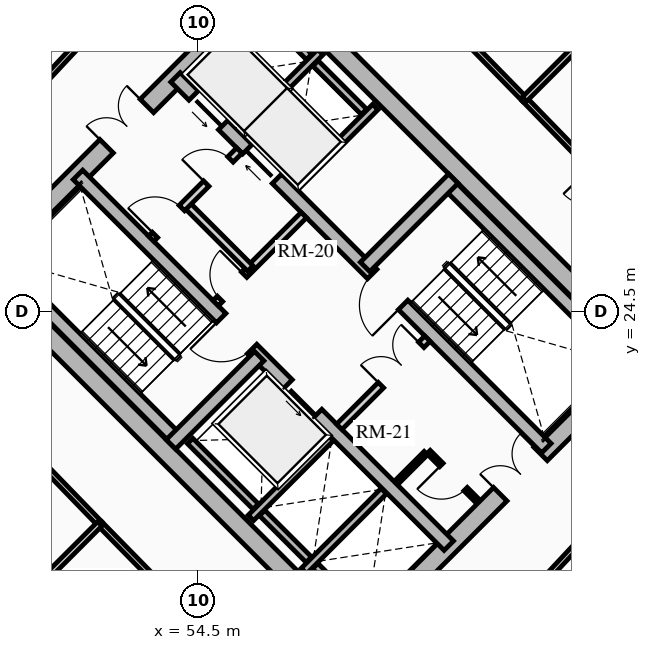
"""IFC4 building model, lengths in metres.
Left out: names, types, materials, properties, quantities, classifications, styles, units other than length and angle.
Written with IfcOpenShell. Run it as: python <this file> out.ifc"""

import sys

from ifc_helpers import new_model, si_unit, direction, frame, frame_2d, origin, place, context, subcontext, project, spatial, rectangle, extrude, source, transform, mapped, element, fill, save


model = new_model("IFC4")
c1 = context("Model", 3, precision=1e-05, world=origin(), true_north=direction((0.0, 1.0)))
c2 = subcontext(c1, "Body", "Model", "MODEL_VIEW")
j1 = project(units=[si_unit("LENGTHUNIT", "METRE"), si_unit("PLANEANGLEUNIT", "RADIAN")], contexts=[c1])
p1 = place(None, origin())
s1 = spatial("IfcSite", under=j1, at=p1, CompositionType="ELEMENT")
p2 = place(p1, origin())
s2 = spatial("IfcBuilding", under=s1, at=p2, CompositionType="ELEMENT")
p3 = place(p2, frame((0.0, 0.0, 56.92)))
s3 = spatial("IfcBuildingStorey", under=s2, at=p3, CompositionType="ELEMENT", Elevation=56.92)
for number, where, z_axis, x_axis in (
    (1, (58.773, 15.661, 0.0), (0.0, 0.0, 1.0), (-0.707, 0.707, 0.0)),
    (2, (66.339, 23.227, 0.0), (0.0, 0.0, 1.0), (-0.707, 0.707, 0.0)),
):
    element("IfcWall", number, at=place(p3, frame(where, z_axis=z_axis, x_axis=x_axis)), inside=s3, PredefinedType="SHEAR", context=c2, shape_type="SweptSolid", body=[
        extrude(rectangle(XDim=14.3, YDim=0.5, at=frame_2d((7.15, 0.0))), origin(), (0.0, 0.0, 1.0), 2.91),
    ])
p4 = place(p3, frame((58.596, 15.838, 0.0), z_axis=(0.0, 0.0, 1.0), x_axis=(0.707106781187, 0.707106781187, 0.0)))
e3 = element("IfcWall", 3, at=p4, inside=s3, PredefinedType="SHEAR", context=c2, shape_type="SweptSolid", body=[
    extrude(rectangle(XDim=10.7, YDim=0.5, at=frame_2d((5.35, 0.0))), origin(), (0.0, 0.0, 1.0), 2.91),
])
m1 = source(origin(), c2, "Body", "SweptSolid", [
    extrude(rectangle(XDim=1.5, YDim=2.02, at=frame_2d((0.75, 1.01))), frame((0.0, 0.26, 0.0), z_axis=(0.0, -1.0, 0.0), x_axis=(1.0, 0.0, 0.0)), (0.0, 0.0, 1.0), 0.52),
])
p5 = place(p4, frame((5.45, 0.0, 0.0)))
e4 = element("IfcOpeningElement", 4, at=p5, cuts=e3, PredefinedType="OPENING", context=c2, shape_type="MappedRepresentation", body=[
    mapped(m1, transform((0.0, 0.0, 0.0), x_axis=(1.0, 0.0, 0.0), y_axis=(0.0, 1.0, 0.0), z_axis=(0.0, 0.0, 1.0), scale=1.0)),
])
p6 = place(p3, frame((48.838, 25.596, 0.0), z_axis=(0.0, 0.0, 1.0), x_axis=(0.707106781187, 0.707106781187, 0.0)))
e5 = element("IfcWall", 5, at=p6, inside=s3, PredefinedType="SHEAR", context=c2, shape_type="SweptSolid", body=[
    extrude(rectangle(XDim=10.7, YDim=0.5, at=frame_2d((5.35, 0.0))), origin(), (0.0, 0.0, 1.0), 2.91),
])
p7 = place(p6, frame((4.6, 0.0, 0.0)))
e6 = element("IfcOpeningElement", 6, at=p7, cuts=e5, PredefinedType="OPENING", context=c2, shape_type="MappedRepresentation", body=[
    mapped(m1, transform((0.0, 0.0, 0.0), x_axis=(1.0, 0.0, 0.0), y_axis=(0.0, 1.0, 0.0), z_axis=(0.0, 0.0, 1.0), scale=1.0)),
])
p8 = place(p3, frame((61.096, 18.338, 0.0), z_axis=(0.0, 0.0, 1.0), x_axis=(-0.707106781187, 0.707106781187, 0.0)))
e7 = element("IfcWall", 7, at=p8, inside=s3, PredefinedType="SHEAR", context=c2, shape_type="SweptSolid", body=[
    extrude(rectangle(XDim=13.8, YDim=0.35, at=frame_2d((6.9, 0.0))), origin(), (0.0, 0.0, 1.0), 2.91),
])
m2 = source(origin(), c2, "Body", "SweptSolid", [
    extrude(rectangle(XDim=1.1, YDim=2.015, at=frame_2d((0.55, 1.007))), frame((0.0, 0.185, 0.0), z_axis=(0.0, -1.0, 0.0), x_axis=(1.0, 0.0, 0.0)), (0.0, 0.0, 1.0), 0.37),
])
p9 = place(p8, frame((4.9, 0.0, 0.0)))
e8 = element("IfcOpeningElement", 8, at=p9, cuts=e7, PredefinedType="OPENING", context=c2, shape_type="MappedRepresentation", body=[
    mapped(m2, transform((0.0, 0.0, 0.0), x_axis=(1.0, 0.0, 0.0), y_axis=(0.0, 1.0, 0.0), z_axis=(0.0, 0.0, 1.0), scale=1.0)),
])
m3 = source(origin(), c2, "Body", "SweptSolid", [
    extrude(rectangle(XDim=1.15, YDim=2.02, at=frame_2d((0.575, 1.01))), frame((0.0, 0.185, 0.0), z_axis=(0.0, -1.0, 0.0), x_axis=(1.0, 0.0, 0.0)), (0.0, 0.0, 1.0), 0.37),
])
p10 = place(p8, frame((7.32, 0.0, 0.0)))
e9 = element("IfcOpeningElement", 9, at=p10, cuts=e7, PredefinedType="OPENING", context=c2, shape_type="MappedRepresentation", body=[
    mapped(m3, transform((0.0, 0.0, 0.0), x_axis=(1.0, 0.0, 0.0), y_axis=(0.0, 1.0, 0.0), z_axis=(0.0, 0.0, 1.0), scale=1.0)),
])
p11 = place(p3, frame((63.662, 20.904, 0.0), z_axis=(0.0, 0.0, 1.0), x_axis=(-0.707106781187, 0.707106781187, 0.0)))
e10 = element("IfcWall", 10, at=p11, inside=s3, PredefinedType="SHEAR", context=c2, shape_type="SweptSolid", body=[
    extrude(rectangle(XDim=13.8, YDim=0.35, at=frame_2d((6.9, 0.0))), origin(), (0.0, 0.0, 1.0), 2.91),
])
p12 = place(p11, frame((10.025, 0.0, 0.0)))
e11 = element("IfcOpeningElement", 11, at=p12, cuts=e10, PredefinedType="OPENING", context=c2, shape_type="MappedRepresentation", body=[
    mapped(m2, transform((0.0, 0.0, 0.0), x_axis=(1.0, 0.0, 0.0), y_axis=(0.0, 1.0, 0.0), z_axis=(0.0, 0.0, 1.0), scale=1.0)),
])
p13 = place(p11, frame((12.025, 0.0, 0.0)))
e12 = element("IfcOpeningElement", 12, at=p13, cuts=e10, PredefinedType="OPENING", context=c2, shape_type="MappedRepresentation", body=[
    mapped(m2, transform((0.0, 0.0, 0.0), x_axis=(1.0, 0.0, 0.0), y_axis=(0.0, 1.0, 0.0), z_axis=(0.0, 0.0, 1.0), scale=1.0)),
])
p14 = place(p11, frame((5.33, 0.0, 0.0)))
e13 = element("IfcOpeningElement", 13, at=p14, cuts=e10, PredefinedType="OPENING", context=c2, shape_type="MappedRepresentation", body=[
    mapped(m3, transform((0.0, 0.0, 0.0), x_axis=(1.0, 0.0, 0.0), y_axis=(0.0, 1.0, 0.0), z_axis=(0.0, 0.0, 1.0), scale=1.0)),
])
p15 = place(p3, frame((53.922, 21.141, 0.0), z_axis=(0.0, 0.0, 1.0), x_axis=(-0.707106781187, 0.707106781187, 0.0)))
e14 = element("IfcWall", 14, at=p15, inside=s3, PredefinedType="SHEAR", context=c2, shape_type="SweptSolid", body=[
    extrude(rectangle(XDim=6.745, YDim=0.35, at=frame_2d((3.373, 0.0))), origin(), (0.0, 0.0, 1.0), 2.91),
])
p16 = place(p3, frame((53.784, 21.003, 0.0), z_axis=(0.0, 0.0, 1.0), x_axis=(0.707106781187, 0.707106781187, 0.0)))
e15 = element("IfcWall", 15, at=p16, inside=s3, PredefinedType="SHEAR", context=c2, shape_type="SweptSolid", body=[
    extrude(rectangle(XDim=3.285, YDim=0.35, at=frame_2d((1.643, 0.0))), origin(), (0.0, 0.0, 1.0), 2.91),
])
p17 = place(p3, frame((65.847, 23.089, 0.0), z_axis=(0.0, 0.0, 1.0), x_axis=(-0.707106781187, 0.707106781187, 0.0)))
e16 = element("IfcWall", 16, at=p17, inside=s3, PredefinedType="SHEAR", context=c2, shape_type="SweptSolid", body=[
    extrude(rectangle(XDim=6.745, YDim=0.35, at=frame_2d((3.373, 0.0))), origin(), (0.0, 0.0, 1.0), 2.91),
])
p18 = place(p3, frame((58.893, 25.674, 0.0), z_axis=(0.0, 0.0, 1.0), x_axis=(0.707106781187, 0.707106781187, 0.0)))
e17 = element("IfcWall", 17, at=p18, inside=s3, PredefinedType="SHEAR", context=c2, shape_type="SweptSolid", body=[
    extrude(rectangle(XDim=3.285, YDim=0.35, at=frame_2d((1.643, 0.0))), origin(), (0.0, 0.0, 1.0), 2.91),
])
p19 = place(p3, frame((55.888, 19.069, 0.0), z_axis=(0.0, 0.0, 1.0), x_axis=(0.707106781187, 0.707106781187, 0.0)))
e18 = element("IfcWall", 18, at=p19, inside=s3, PredefinedType="SHEAR", context=c2, shape_type="SweptSolid", body=[
    extrude(rectangle(XDim=2.97, YDim=0.2, at=frame_2d((1.485, 0.0))), origin(), (0.0, 0.0, 1.0), 2.91),
])
p20 = place(p3, frame((56.015, 19.366, 0.0), z_axis=(0.0, 0.0, 1.0), x_axis=(-0.707106781187, 0.707106781187, 0.0)))
e19 = element("IfcWall", 19, at=p20, inside=s3, PredefinedType="SHEAR", context=c2, shape_type="SweptSolid", body=[
    extrude(rectangle(XDim=2.44, YDim=0.2, at=frame_2d((1.22, 0.0))), origin(), (0.0, 0.0, 1.0), 2.91),
])
p21 = place(p3, frame((57.284, 17.673, 0.0), z_axis=(0.0, 0.0, 1.0), x_axis=(0.707147878904, 0.70706568108, 0.0)))
e20 = element("IfcWall", 20, at=p21, inside=s3, PredefinedType="SHEAR", context=c2, shape_type="SweptSolid", body=[
    extrude(rectangle(XDim=2.97, YDim=0.2, at=frame_2d((1.485, 0.0))), origin(), (0.0, 0.0, 1.0), 2.91),
])
p22 = place(p3, frame((57.412, 17.97, 0.0), z_axis=(0.0, 0.0, 1.0), x_axis=(-0.707106781187, 0.707106781187, 0.0)))
e21 = element("IfcWall", 21, at=p22, inside=s3, PredefinedType="SHEAR", context=c2, shape_type="SweptSolid", body=[
    extrude(rectangle(XDim=1.735, YDim=0.2, at=frame_2d((0.867, 0.0))), origin(), (0.0, 0.0, 1.0), 2.91),
])
p23 = place(p3, frame((58.737, 16.644, 0.0), z_axis=(0.0, 0.0, 1.0), x_axis=(-0.707032117043, 0.707181437447, 0.0)))
e22 = element("IfcWall", 22, at=p23, inside=s3, PredefinedType="SHEAR", context=c2, shape_type="SweptSolid", body=[
    extrude(rectangle(XDim=1.635, YDim=0.2, at=frame_2d((0.817, 0.0))), origin(), (0.0, 0.0, 1.0), 2.91),
])
p24 = place(p3, frame((57.062, 27.781, 0.0), z_axis=(0.0, 0.0, 1.0), x_axis=(0.707106781187, 0.707106781187, 0.0)))
e23 = element("IfcWall", 23, at=p24, inside=s3, PredefinedType="SHEAR", context=c2, shape_type="SweptSolid", body=[
    extrude(rectangle(XDim=2.97, YDim=0.2, at=frame_2d((1.485, 0.0))), origin(), (0.0, 0.0, 1.0), 2.91),
])
p25 = place(p3, frame((55.615, 29.227, 0.0), z_axis=(0.0, 0.0, 1.0), x_axis=(0.707147878904, 0.70706568108, 0.0)))
e24 = element("IfcWall", 24, at=p25, inside=s3, PredefinedType="SHEAR", context=c2, shape_type="SweptSolid", body=[
    extrude(rectangle(XDim=2.97, YDim=0.2, at=frame_2d((1.485, 0.0))), origin(), (0.0, 0.0, 1.0), 2.91),
])
p26 = place(p3, frame((58.865, 29.754, 0.0), z_axis=(0.0, 0.0, 1.0), x_axis=(-0.707174411312, 0.707039144592, 0.0)))
e25 = element("IfcWall", 25, at=p26, inside=s3, PredefinedType="SHEAR", context=c2, shape_type="SweptSolid", body=[
    extrude(rectangle(XDim=1.805, YDim=0.2, at=frame_2d((0.902, 0.0))), origin(), (0.0, 0.0, 1.0), 2.91),
])
p27 = place(p3, frame((57.419, 31.2, 0.0), z_axis=(0.0, 0.0, 1.0), x_axis=(-0.707032117043, 0.707181437447, 0.0)))
e26 = element("IfcWall", 26, at=p27, inside=s3, PredefinedType="SHEAR", context=c2, shape_type="SweptSolid", body=[
    extrude(rectangle(XDim=1.635, YDim=0.2, at=frame_2d((0.817, 0.0))), origin(), (0.0, 0.0, 1.0), 2.91),
])
p28 = place(p3, frame((58.214, 21.467, 0.0), z_axis=(0.0, 0.0, 1.0), x_axis=(0.707106781187, 0.707106781187, 0.0)))
e27 = element("IfcWall", 27, at=p28, inside=s3, PredefinedType="PARTITIONING", context=c2, shape_type="SweptSolid", body=[
    extrude(rectangle(XDim=3.28, YDim=0.2, at=frame_2d((1.64, 0.0))), origin(), (0.0, 0.0, 1.0), 2.635),
])
m4 = source(origin(), c2, "Body", "SweptSolid", [
    extrude(rectangle(XDim=1.5, YDim=2.02, at=frame_2d((0.75, 1.01))), frame((0.0, 0.11, 0.0), z_axis=(0.0, -1.0, 0.0), x_axis=(1.0, 0.0, 0.0)), (0.0, 0.0, 1.0), 0.22),
])
p29 = place(p28, frame((1.55, 0.0, 0.0)))
e28 = element("IfcOpeningElement", 28, at=p29, cuts=e27, PredefinedType="OPENING", context=c2, shape_type="MappedRepresentation", body=[
    mapped(m4, transform((0.0, 0.0, 0.0), x_axis=(1.0, 0.0, 0.0), y_axis=(0.0, 1.0, 0.0), z_axis=(0.0, 0.0, 1.0), scale=1.0)),
])
p30 = place(p3, frame((54.961, 24.719, 0.0), z_axis=(0.0, 0.0, 1.0), x_axis=(0.707106781187, 0.707106781187, 0.0)))
e29 = element("IfcWall", 29, at=p30, inside=s3, PredefinedType="PARTITIONING", context=c2, shape_type="SweptSolid", body=[
    extrude(rectangle(XDim=3.28, YDim=0.2, at=frame_2d((1.64, 0.0))), origin(), (0.0, 0.0, 1.0), 2.635),
])
m5 = source(origin(), c2, "Body", "SweptSolid", [
    extrude(rectangle(XDim=0.9, YDim=2.005, at=frame_2d((0.45, 1.002))), frame((0.0, 0.11, 0.0), z_axis=(0.0, -1.0, 0.0), x_axis=(1.0, 0.0, 0.0)), (0.0, 0.0, 1.0), 0.22),
])
p31 = place(p30, frame((0.16, 0.0, 0.0)))
e30 = element("IfcOpeningElement", 30, at=p31, cuts=e29, PredefinedType="OPENING", context=c2, shape_type="MappedRepresentation", body=[
    mapped(m5, transform((0.0, 0.0, 0.0), x_axis=(1.0, 0.0, 0.0), y_axis=(0.0, 1.0, 0.0), z_axis=(0.0, 0.0, 1.0), scale=1.0)),
])
p32 = place(p3, frame((55.874, 25.631, 0.0), z_axis=(0.0, 0.0, 1.0), x_axis=(-0.707157639372, 0.707055919343, 0.0)))
e31 = element("IfcWall", 31, at=p32, inside=s3, PredefinedType="PARTITIONING", context=c2, shape_type="SweptSolid", body=[
    extrude(rectangle(XDim=2.4, YDim=0.2, at=frame_2d((1.2, 0.0))), origin(), (0.0, 0.0, 1.0), 2.635),
])
p33 = place(p3, frame((53.264, 26.416, 0.0), z_axis=(0.0, 0.0, 1.0), x_axis=(0.707106781187, 0.707106781187, 0.0)))
e32 = element("IfcWall", 32, at=p33, inside=s3, PredefinedType="PARTITIONING", context=c2, shape_type="SweptSolid", body=[
    extrude(rectangle(XDim=3.28, YDim=0.2, at=frame_2d((1.64, 0.0))), origin(), (0.0, 0.0, 1.0), 2.635),
])
m6 = source(origin(), c2, "Body", "SweptSolid", [
    extrude(rectangle(XDim=1.0, YDim=2.015, at=frame_2d((0.5, 1.007))), frame((0.0, 0.11, 0.0), z_axis=(0.0, -1.0, 0.0), x_axis=(1.0, 0.0, 0.0)), (0.0, 0.0, 1.0), 0.22),
])
p34 = place(p33, frame((0.14, 0.0, 0.0)))
e33 = element("IfcOpeningElement", 33, at=p34, cuts=e32, PredefinedType="OPENING", context=c2, shape_type="MappedRepresentation", body=[
    mapped(m6, transform((0.0, 0.0, 0.0), x_axis=(1.0, 0.0, 0.0), y_axis=(0.0, 1.0, 0.0), z_axis=(0.0, 0.0, 1.0), scale=1.0)),
])
p35 = place(p33, frame((2.05, 0.0, 0.0)))
e34 = element("IfcOpeningElement", 34, at=p35, cuts=e32, PredefinedType="OPENING", context=c2, shape_type="MappedRepresentation", body=[
    mapped(m5, transform((0.0, 0.0, 0.0), x_axis=(1.0, 0.0, 0.0), y_axis=(0.0, 1.0, 0.0), z_axis=(0.0, 0.0, 1.0), scale=1.0)),
])
p36 = place(p3, frame((61.835, 19.529, 0.0), z_axis=(0.0, 0.0, 1.0), x_axis=(-0.707174592913, 0.707038962956, 0.0)))
e35 = element("IfcWall", 35, at=p36, inside=s3, PredefinedType="PARTITIONING", context=c2, shape_type="SweptSolid", body=[
    extrude(rectangle(XDim=1.8, YDim=0.125, at=frame_2d((0.9, 0.0))), origin(), (0.0, 0.0, 1.0), 2.635),
])
m7 = source(origin(), c2, "Body", "SweptSolid", [
    extrude(rectangle(XDim=0.9, YDim=2.005, at=frame_2d((0.45, 1.002))), frame((0.0, 0.073, 0.0), z_axis=(0.0, -1.0, 0.0), x_axis=(1.0, 0.0, 0.0)), (0.0, 0.0, 1.0), 0.145),
])
p37 = place(p36, frame((0.42, 0.0, 0.0)))
e36 = element("IfcOpeningElement", 36, at=p37, cuts=e35, PredefinedType="OPENING", context=c2, shape_type="MappedRepresentation", body=[
    mapped(m7, transform((0.0, 0.0, 0.0), x_axis=(1.0, 0.0, 0.0), y_axis=(0.0, 1.0, 0.0), z_axis=(0.0, 0.0, 1.0), scale=1.0)),
])
p38 = place(p3, frame((59.713, 19.996, 0.0), z_axis=(0.0, 0.0, 1.0), x_axis=(0.707217726, 0.706995818963, 0.0)))
e37 = element("IfcWall", 37, at=p38, inside=s3, PredefinedType="PARTITIONING", context=c2, shape_type="SweptSolid", body=[
    extrude(rectangle(XDim=1.1, YDim=0.125, at=frame_2d((0.55, 0.0))), origin(), (0.0, 0.0, 1.0), 2.635),
])
p39 = place(p3, frame((63.086, 30.086, 0.0), z_axis=(0.0, 0.0, 1.0), x_axis=(-0.699075897379, 0.715047473741, 0.0)))
e38 = element("IfcWall", 38, at=p39, inside=s3, PredefinedType="PARTITIONING", context=c2, shape_type="SweptSolid", body=[
    extrude(rectangle(XDim=6.114, YDim=0.15, at=frame_2d((3.057, 0.0))), origin(), (0.0, 0.0, 1.0), 2.159),
])
p40 = place(p3, frame((52.043, 32.28, 0.0), z_axis=(0.0, 0.0, 1.0), x_axis=(-0.682606081633, -0.730786519661, 0.0)))
e39 = element("IfcWall", 39, at=p40, inside=s3, PredefinedType="PARTITIONING", context=c2, shape_type="SweptSolid", body=[
    extrude(rectangle(XDim=6.527, YDim=0.15, at=frame_2d((3.263, 0.0))), origin(), (0.0, 0.0, 1.0), 2.159),
])
p41 = place(p3, frame((47.706, 23.253, 0.0), z_axis=(0.0, 0.0, 1.0), x_axis=(0.696179266346, -0.717867974707, 0.0)))
e40 = element("IfcWall", 40, at=p41, inside=s3, PredefinedType="PARTITIONING", context=c2, shape_type="SweptSolid", body=[
    extrude(rectangle(XDim=6.045, YDim=0.15, at=frame_2d((3.022, 0.0))), origin(), (0.0, 0.0, 1.0), 2.635),
])
p42 = place(p3, frame((51.914, 18.914, 0.0), z_axis=(0.0, 0.0, 1.0), x_axis=(0.699999313799, -0.714143515465, 0.0)))
e41 = element("IfcWall", 41, at=p42, inside=s3, PredefinedType="PARTITIONING", context=c2, shape_type="SweptSolid", body=[
    extrude(rectangle(XDim=6.162, YDim=0.15, at=frame_2d((3.081, 0.0))), origin(), (0.0, 0.0, 1.0), 2.159),
])
p43 = place(p3, frame((62.903, 16.667, 0.0), z_axis=(0.0, 0.0, 1.0), x_axis=(0.682371947497, 0.731005147225, 0.0)))
e42 = element("IfcWall", 42, at=p43, inside=s3, PredefinedType="PARTITIONING", context=c2, shape_type="SweptSolid", body=[
    extrude(rectangle(XDim=6.642, YDim=0.15, at=frame_2d((3.321, 0.0))), origin(), (0.0, 0.0, 1.0), 2.159),
])
p44 = place(p3, frame((67.27, 25.78, 0.0), z_axis=(0.0, 0.0, 1.0), x_axis=(-0.696847842907, 0.717218992942, 0.0)))
e43 = element("IfcWall", 43, at=p44, inside=s3, PredefinedType="PARTITIONING", context=c2, shape_type="SweptSolid", body=[
    extrude(rectangle(XDim=6.004, YDim=0.15, at=frame_2d((3.002, 0.0))), origin(), (0.0, 0.0, 1.0), 2.635),
])
m8 = source(origin(), c2, "Body", "SweptSolid", [
    extrude(rectangle(XDim=1.0, YDim=2.015, at=frame_2d((0.5, 1.007))), frame((0.0, 0.085, 0.0), z_axis=(0.0, -1.0, 0.0), x_axis=(1.0, 0.0, 0.0)), (0.0, 0.0, 1.0), 0.17),
])
p45 = place(p44, frame((2.502, 0.0, 0.0)))
e44 = element("IfcOpeningElement", 44, at=p45, cuts=e43, PredefinedType="OPENING", context=c2, shape_type="MappedRepresentation", body=[
    mapped(m8, transform((0.0, 0.0, 0.0), x_axis=(1.0, 0.0, 0.0), y_axis=(0.0, 1.0, 0.0), z_axis=(0.0, 0.0, 1.0), scale=1.0)),
])
for number, where, z_axis, x_axis in (
    (45, (63.086, 30.086, 0.0), (0.0, 0.0, 1.0), (0.707, 0.707, 0.0)),
    (46, (51.914, 18.914, 0.0), (0.0, 0.0, 1.0), (-0.707, -0.707, 0.0)),
):
    element("IfcWall", number, at=place(p3, frame(where, z_axis=z_axis, x_axis=x_axis)), inside=s3, PredefinedType="PARTITIONING", context=c2, shape_type="SweptSolid", body=[
        extrude(rectangle(XDim=7.743, YDim=0.16, at=frame_2d((3.872, 0.0))), origin(), (0.0, 0.0, 1.0), 2.073),
    ])
m9 = source(origin(), c2, "Body", "SweptSolid", [
    extrude(rectangle(XDim=1.1, YDim=2.015, at=frame_2d((0.55, 1.007))), frame((0.0, 0.025, 0.0), z_axis=(0.0, -1.0, 0.0), x_axis=(1.0, 0.0, 0.0)), (0.0, 0.0, 1.0), 0.05),
])
p46 = place(p9, origin())
e47 = element("IfcDoor", 47, at=p46, inside=s3, OperationType="SLIDING_TO_LEFT", PredefinedType="DOOR", context=c2, shape_type="MappedRepresentation", body=[
    mapped(m9, transform((0.0, 0.0, 0.0), x_axis=(1.0, 0.0, 0.0), y_axis=(0.0, 1.0, 0.0), z_axis=(0.0, 0.0, 1.0), scale=1.0)),
])
fill(e8, e47)
p47 = place(p12, origin())
e48 = element("IfcDoor", 48, at=p47, inside=s3, OperationType="SLIDING_TO_RIGHT", PredefinedType="DOOR", context=c2, shape_type="MappedRepresentation", body=[
    mapped(m9, transform((0.0, 0.0, 0.0), x_axis=(1.0, 0.0, 0.0), y_axis=(0.0, 1.0, 0.0), z_axis=(0.0, 0.0, 1.0), scale=1.0)),
])
fill(e11, e48)
p48 = place(p13, origin())
e49 = element("IfcDoor", 49, at=p48, inside=s3, OperationType="SLIDING_TO_LEFT", PredefinedType="DOOR", context=c2, shape_type="MappedRepresentation", body=[
    mapped(m9, transform((0.0, 0.0, 0.0), x_axis=(1.0, 0.0, 0.0), y_axis=(0.0, 1.0, 0.0), z_axis=(0.0, 0.0, 1.0), scale=1.0)),
])
fill(e12, e49)
m10 = source(origin(), c2, "Body", "SweptSolid", [
    extrude(rectangle(XDim=1.15, YDim=2.02, at=frame_2d((0.575, 1.01))), frame((0.0, 0.025, 0.0), z_axis=(0.0, -1.0, 0.0), x_axis=(1.0, 0.0, 0.0)), (0.0, 0.0, 1.0), 0.05),
])
p49 = place(p10, origin())
e50 = element("IfcDoor", 50, at=p49, inside=s3, OperationType="SINGLE_SWING_RIGHT", PredefinedType="DOOR", context=c2, shape_type="MappedRepresentation", body=[
    mapped(m10, transform((0.0, 0.0, 0.0), x_axis=(1.0, 0.0, 0.0), y_axis=(0.0, 1.0, 0.0), z_axis=(0.0, 0.0, 1.0), scale=1.0)),
])
fill(e9, e50)
p50 = place(p14, origin())
e51 = element("IfcDoor", 51, at=p50, inside=s3, OperationType="SINGLE_SWING_LEFT", PredefinedType="DOOR", context=c2, shape_type="MappedRepresentation", body=[
    mapped(m10, transform((0.0, 0.0, 0.0), x_axis=(1.0, 0.0, 0.0), y_axis=(0.0, 1.0, 0.0), z_axis=(0.0, 0.0, 1.0), scale=1.0)),
])
fill(e13, e51)
m11 = source(origin(), c2, "Body", "SweptSolid", [
    extrude(rectangle(XDim=1.5, YDim=2.02, at=frame_2d((0.75, 1.01))), frame((0.0, 0.025, 0.0), z_axis=(0.0, -1.0, 0.0), x_axis=(1.0, 0.0, 0.0)), (0.0, 0.0, 1.0), 0.05),
])
p51 = place(p7, origin())
e52 = element("IfcDoor", 52, at=p51, inside=s3, OperationType="DOUBLE_DOOR_SINGLE_SWING", PredefinedType="DOOR", context=c2, shape_type="MappedRepresentation", body=[
    mapped(m11, transform((0.0, 0.0, 0.0), x_axis=(1.0, 0.0, 0.0), y_axis=(0.0, 1.0, 0.0), z_axis=(0.0, 0.0, 1.0), scale=1.0)),
])
fill(e6, e52)
p52 = place(p5, origin())
e53 = element("IfcDoor", 53, at=p52, inside=s3, OperationType="DOUBLE_DOOR_SINGLE_SWING", PredefinedType="DOOR", context=c2, shape_type="MappedRepresentation", body=[
    mapped(m11, transform((0.0, 0.0, 0.0), x_axis=(1.0, 0.0, 0.0), y_axis=(0.0, 1.0, 0.0), z_axis=(0.0, 0.0, 1.0), scale=1.0)),
])
fill(e4, e53)
p53 = place(p29, origin())
e54 = element("IfcDoor", 54, at=p53, inside=s3, OperationType="DOUBLE_DOOR_SINGLE_SWING", PredefinedType="DOOR", context=c2, shape_type="MappedRepresentation", body=[
    mapped(m11, transform((0.0, 0.0, 0.0), x_axis=(1.0, 0.0, 0.0), y_axis=(0.0, 1.0, 0.0), z_axis=(0.0, 0.0, 1.0), scale=1.0)),
])
fill(e28, e54)
m12 = source(origin(), c2, "Body", "SweptSolid", [
    extrude(rectangle(XDim=0.9, YDim=2.005, at=frame_2d((0.45, 1.002))), frame((0.0, 0.025, 0.0), z_axis=(0.0, -1.0, 0.0), x_axis=(1.0, 0.0, 0.0)), (0.0, 0.0, 1.0), 0.05),
])
p54 = place(p31, origin())
e55 = element("IfcDoor", 55, at=p54, inside=s3, OperationType="SINGLE_SWING_RIGHT", PredefinedType="DOOR", context=c2, shape_type="MappedRepresentation", body=[
    mapped(m12, transform((0.0, 0.0, 0.0), x_axis=(1.0, 0.0, 0.0), y_axis=(0.0, 1.0, 0.0), z_axis=(0.0, 0.0, 1.0), scale=1.0)),
])
fill(e30, e55)
m13 = source(origin(), c2, "Body", "SweptSolid", [
    extrude(rectangle(XDim=1.0, YDim=2.015, at=frame_2d((0.5, 1.007))), frame((0.0, 0.025, 0.0), z_axis=(0.0, -1.0, 0.0), x_axis=(1.0, 0.0, 0.0)), (0.0, 0.0, 1.0), 0.05),
])
p55 = place(p34, origin())
e56 = element("IfcDoor", 56, at=p55, inside=s3, OperationType="SINGLE_SWING_LEFT", PredefinedType="DOOR", context=c2, shape_type="MappedRepresentation", body=[
    mapped(m13, transform((0.0, 0.0, 0.0), x_axis=(1.0, 0.0, 0.0), y_axis=(0.0, 1.0, 0.0), z_axis=(0.0, 0.0, 1.0), scale=1.0)),
])
fill(e33, e56)
p56 = place(p37, origin())
e57 = element("IfcDoor", 57, at=p56, inside=s3, OperationType="SINGLE_SWING_RIGHT", PredefinedType="DOOR", context=c2, shape_type="MappedRepresentation", body=[
    mapped(m12, transform((0.0, 0.0, 0.0), x_axis=(1.0, 0.0, 0.0), y_axis=(0.0, 1.0, 0.0), z_axis=(0.0, 0.0, 1.0), scale=1.0)),
])
fill(e36, e57)
p57 = place(p35, origin())
e58 = element("IfcDoor", 58, at=p57, inside=s3, OperationType="SINGLE_SWING_LEFT", PredefinedType="DOOR", context=c2, shape_type="MappedRepresentation", body=[
    mapped(m12, transform((0.0, 0.0, 0.0), x_axis=(1.0, 0.0, 0.0), y_axis=(0.0, 1.0, 0.0), z_axis=(0.0, 0.0, 1.0), scale=1.0)),
])
fill(e34, e58)
save(model, sys.argv[1])
